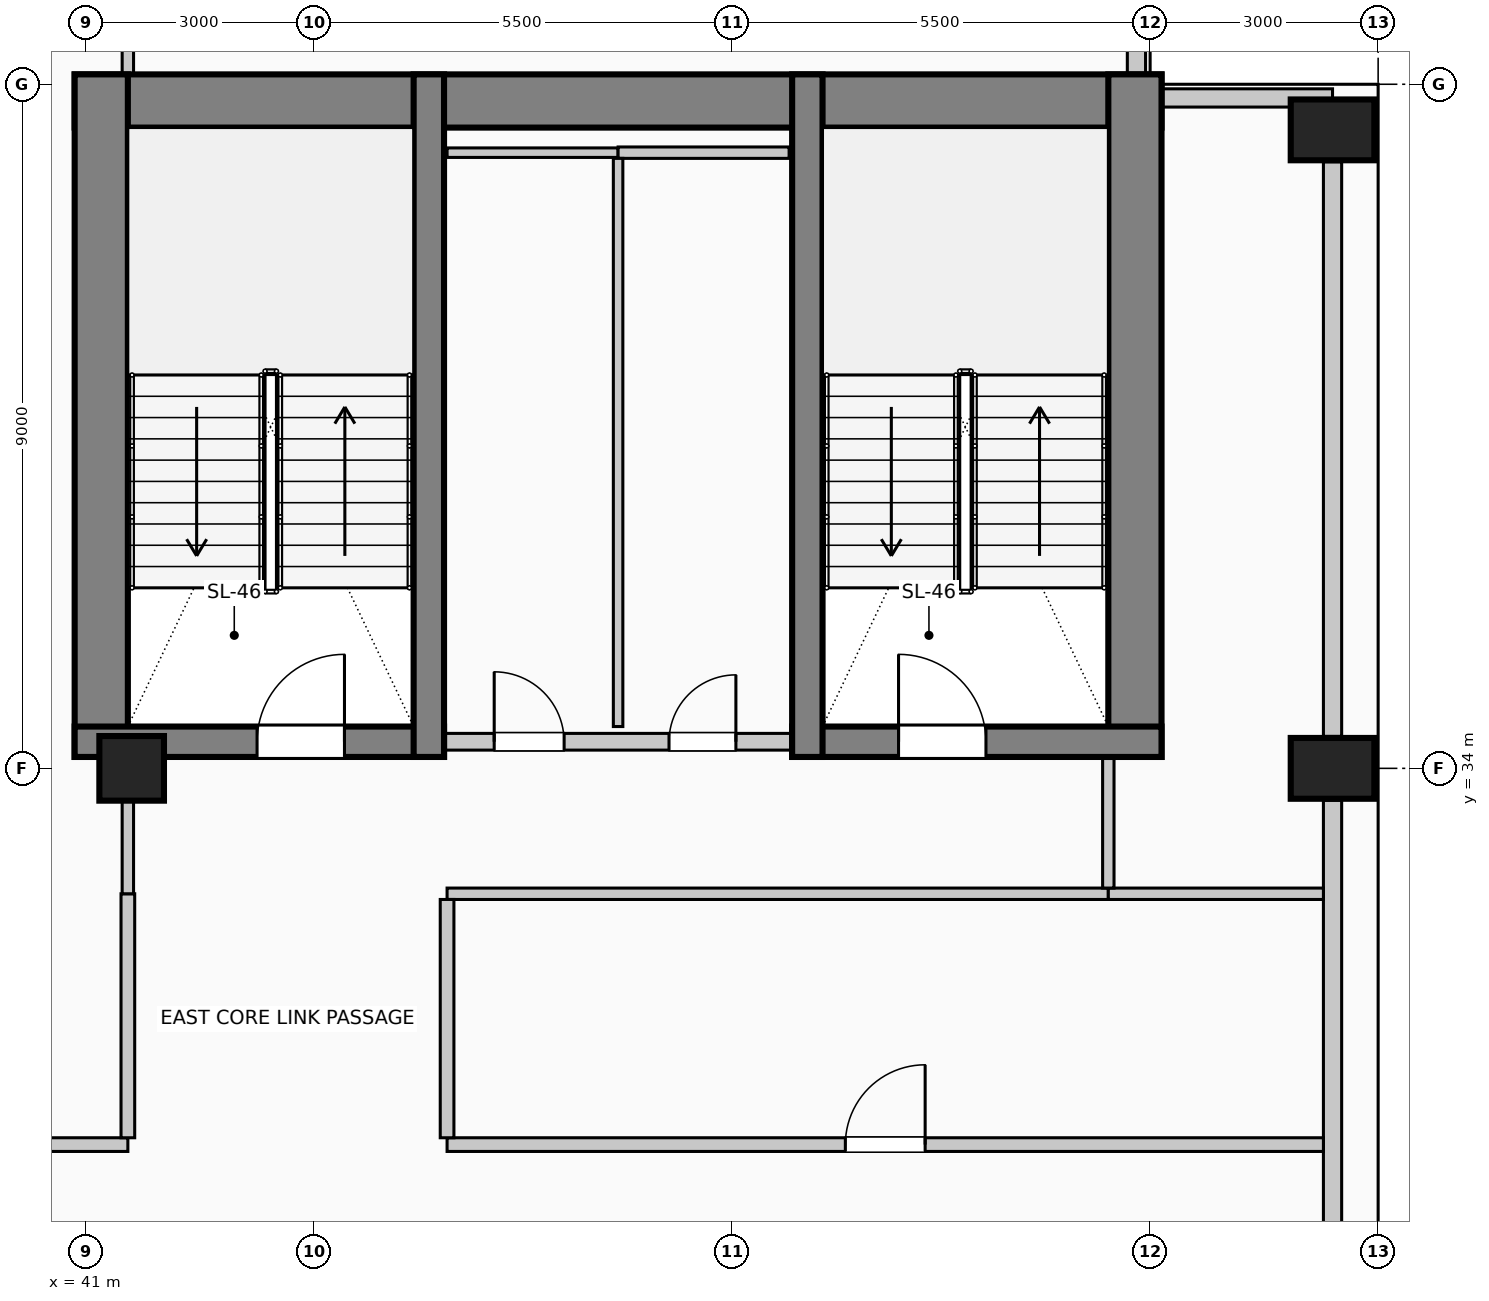
"""IFC4 building model, lengths in metres.
Left out: names, types, materials, properties, quantities, classifications, styles, units other than length and angle.
Written with IfcOpenShell. Run it as: python <this file> out.ifc"""

import sys

from ifc_helpers import new_model, si_unit, direction, frame, frame_2d, origin, origin_2d, place, context, subcontext, project, spatial, rectangle, circle, extrude, element, fill, save


model = new_model("IFC4")
c1 = context("Model", 3, precision=1e-05, world=origin(), true_north=direction((0.0, 1.0)))
c2 = subcontext(c1, "Body", "Model", "MODEL_VIEW")
j1 = project(units=[si_unit("LENGTHUNIT", "METRE"), si_unit("PLANEANGLEUNIT", "RADIAN")], contexts=[c1])
p1 = place(None, origin())
s1 = spatial("IfcSite", under=j1, at=p1, CompositionType="ELEMENT")
p2 = place(p1, origin())
s2 = spatial("IfcBuilding", under=s1, at=p2, CompositionType="ELEMENT")
p3 = place(p2, frame((0.0, 0.0, 206.6)))
s3 = spatial("IfcBuildingStorey", under=s2, at=p3, CompositionType="ELEMENT", Elevation=206.6)
p4 = place(p3, frame((40.85, 42.78, 0.0), z_axis=(0.0, 0.0, 1.0), x_axis=(1.0, 0.0, 0.0)))
e1 = element("IfcWall", 1, at=p4, inside=s3, PredefinedType="SHEAR", context=c2, shape_type="SweptSolid", body=[
    extrude(rectangle(XDim=14.3, YDim=0.7, at=frame_2d((7.15, 0.0))), origin(), (0.0, 0.0, 1.0), 4.0),
])
for number, where, z_axis, x_axis in (
    (2, (41.2, 34.15, 0.0), (0.0, 0.0, 1.0), (0.0, 1.0, 0.0)),
    (3, (54.8, 34.15, 0.0), (0.0, 0.0, 1.0), (0.0, 1.0, 0.0)),
):
    element("IfcWall", number, at=place(p3, frame(where, z_axis=z_axis, x_axis=x_axis)), inside=s3, PredefinedType="SHEAR", context=c2, shape_type="SweptSolid", body=[
        extrude(rectangle(XDim=8.98, YDim=0.7, at=frame_2d((4.49, 0.0))), origin(), (0.0, 0.0, 1.0), 4.0),
    ])
p5 = place(p3, frame((40.85, 34.35, 0.0), z_axis=(0.0, 0.0, 1.0), x_axis=(1.0, 0.0, 0.0)))
e4 = element("IfcWall", 4, at=p5, inside=s3, PredefinedType="SHEAR", context=c2, shape_type="SweptSolid", body=[
    extrude(rectangle(XDim=4.86, YDim=0.4, at=frame_2d((2.43, 0.0))), origin(), (0.0, 0.0, 1.0), 4.0),
])
p6 = place(p5, frame((2.4, 0.0, 0.0)))
e5 = element("IfcOpeningElement", 5, at=p6, cuts=e4, PredefinedType="OPENING", context=c2, shape_type="SweptSolid", body=[
    extrude(rectangle(XDim=1.15, YDim=2.2, at=frame_2d((0.575, 1.1))), frame((0.0, 0.21, 0.0), z_axis=(0.0, -1.0, 0.0), x_axis=(1.0, 0.0, 0.0)), (0.0, 0.0, 1.0), 0.42),
])
p7 = place(p3, frame((45.51, 34.15, 0.0), z_axis=(0.0, 0.0, 1.0), x_axis=(0.0, 1.0, 0.0)))
e6 = element("IfcWall", 6, at=p7, inside=s3, PredefinedType="SHEAR", context=c2, shape_type="SweptSolid", body=[
    extrude(rectangle(XDim=8.98, YDim=0.4, at=frame_2d((4.49, 0.0))), origin(), (0.0, 0.0, 1.0), 4.0),
])
p8 = place(p3, frame((50.29, 34.35, 0.0), z_axis=(0.0, 0.0, 1.0), x_axis=(1.0, 0.0, 0.0)))
e7 = element("IfcWall", 7, at=p8, inside=s3, PredefinedType="SHEAR", context=c2, shape_type="SweptSolid", body=[
    extrude(rectangle(XDim=4.86, YDim=0.4, at=frame_2d((2.43, 0.0))), origin(), (0.0, 0.0, 1.0), 4.0),
])
p9 = place(p8, frame((1.4, 0.0, 0.0)))
e8 = element("IfcOpeningElement", 8, at=p9, cuts=e7, PredefinedType="OPENING", context=c2, shape_type="SweptSolid", body=[
    extrude(rectangle(XDim=1.15, YDim=2.2, at=frame_2d((0.575, 1.1))), frame((0.0, 0.21, 0.0), z_axis=(0.0, -1.0, 0.0), x_axis=(1.0, 0.0, 0.0)), (0.0, 0.0, 1.0), 0.42),
])
p10 = place(p3, frame((50.49, 34.15, 0.0), z_axis=(0.0, 0.0, 1.0), x_axis=(0.0, 1.0, 0.0)))
e9 = element("IfcWall", 9, at=p10, inside=s3, PredefinedType="SHEAR", context=c2, shape_type="SweptSolid", body=[
    extrude(rectangle(XDim=8.98, YDim=0.4, at=frame_2d((4.49, 0.0))), origin(), (0.0, 0.0, 1.0), 4.0),
])
for number, where, z_axis, x_axis in (
    (10, (57.4, 34.0, 0.0), (0.0, 0.0, 1.0), (0.0, 1.0, 0.0)),
    (11, (57.4, 42.4, 0.0), (0.0, 0.0, 1.0), (0.0, 1.0, 0.0)),
):
    element("IfcColumn", number, at=place(p3, frame(where, z_axis=z_axis, x_axis=x_axis)), inside=s3, PredefinedType="COLUMN", context=c2, shape_type="SweptSolid", body=[
        extrude(rectangle(XDim=0.8, YDim=1.1, at=origin_2d()), origin(), (0.0, 0.0, 1.0), 4.0),
    ])
p11 = place(p3, frame((41.6, 34.0, 0.0), z_axis=(0.0, 0.0, 1.0), x_axis=(1.0, 0.0, 0.0)))
e12 = element("IfcColumn", 12, at=p11, inside=s3, PredefinedType="COLUMN", context=c2, shape_type="SweptSolid", body=[
    extrude(circle(Radius=0.425, at=origin_2d()), origin(), (0.0, 0.0, 1.0), 4.0),
])
p12 = place(p3, frame((57.4, 33.58, 0.0), z_axis=(0.0, 0.0, 1.0), x_axis=(0.0, -1.0, 0.0)))
e13 = element("IfcWall", 13, at=p12, inside=s3, PredefinedType="SOLIDWALL", context=c2, shape_type="SweptSolid", body=[
    extrude(rectangle(XDim=7.16, YDim=0.24, at=frame_2d((3.58, 0.0))), origin(), (0.0, 0.0, 1.0), 3.0),
])
p13 = place(p3, frame((57.4, 41.98, 0.0), z_axis=(0.0, 0.0, 1.0), x_axis=(0.0, -1.0, 0.0)))
e14 = element("IfcWall", 14, at=p13, inside=s3, PredefinedType="SOLIDWALL", context=c2, shape_type="SweptSolid", body=[
    extrude(rectangle(XDim=7.56, YDim=0.24, at=frame_2d((3.78, 0.0))), origin(), (0.0, 0.0, 1.0), 3.0),
])
p14 = place(p3, frame((54.82, 45.4, 0.0), z_axis=(0.0, 0.0, 1.0), x_axis=(0.0, -1.0, 0.0)))
e15 = element("IfcWall", 15, at=p14, inside=s3, PredefinedType="SOLIDWALL", context=c2, shape_type="SweptSolid", body=[
    extrude(rectangle(XDim=2.265, YDim=0.24, at=frame_2d((1.132, 0.0))), origin(), (0.0, 0.0, 1.0), 3.75),
])
p15 = place(p3, frame((55.155, 42.82, 0.0), z_axis=(0.0, 0.0, 1.0), x_axis=(1.0, 0.0, 0.0)))
e16 = element("IfcWall", 16, at=p15, inside=s3, PredefinedType="SOLIDWALL", context=c2, shape_type="SweptSolid", body=[
    extrude(rectangle(XDim=2.245, YDim=0.24, at=frame_2d((1.123, 0.0))), origin(), (0.0, 0.0, 1.0), 3.75),
])
p16 = place(p3, frame((45.72, 34.35, 0.0), z_axis=(0.0, 0.0, 1.0), x_axis=(1.0, 0.0, 0.0)))
e17 = element("IfcWall", 17, at=p16, inside=s3, PredefinedType="PARTITIONING", context=c2, shape_type="SweptSolid", body=[
    extrude(rectangle(XDim=4.56, YDim=0.22, at=frame_2d((2.28, 0.0))), origin(), (0.0, 0.0, 1.0), 3.75),
])
p17 = place(p16, frame((0.65, 0.0, 0.0)))
e18 = element("IfcOpeningElement", 18, at=p17, cuts=e17, PredefinedType="OPENING", context=c2, shape_type="SweptSolid", body=[
    extrude(rectangle(XDim=0.92, YDim=2.1, at=frame_2d((0.46, 1.05))), frame((0.0, 0.12, 0.0), z_axis=(0.0, -1.0, 0.0), x_axis=(1.0, 0.0, 0.0)), (0.0, 0.0, 1.0), 0.24),
])
p18 = place(p16, frame((2.95, 0.0, 0.0)))
e19 = element("IfcOpeningElement", 19, at=p18, cuts=e17, PredefinedType="OPENING", context=c2, shape_type="SweptSolid", body=[
    extrude(rectangle(XDim=0.88, YDim=2.1, at=frame_2d((0.44, 1.05))), frame((0.0, 0.12, 0.0), z_axis=(0.0, -1.0, 0.0), x_axis=(1.0, 0.0, 0.0)), (0.0, 0.0, 1.0), 0.24),
])
p19 = place(p3, frame((34.22, 29.05, 0.0), z_axis=(0.0, 0.0, 1.0), x_axis=(1.0, 0.0, 0.0)))
e20 = element("IfcWall", 20, at=p19, inside=s3, PredefinedType="PARTITIONING", context=c2, shape_type="SweptSolid", body=[
    extrude(rectangle(XDim=7.33, YDim=0.18, at=frame_2d((3.665, 0.0))), origin(), (0.0, 0.0, 1.0), 3.75),
])
p20 = place(p19, frame((3.19, 0.0, 0.0)))
e21 = element("IfcOpeningElement", 21, at=p20, cuts=e20, PredefinedType="OPENING", context=c2, shape_type="SweptSolid", body=[
    extrude(rectangle(XDim=0.95, YDim=2.15, at=frame_2d((0.475, 1.075))), frame((0.0, 0.1, 0.0), z_axis=(0.0, -1.0, 0.0), x_axis=(1.0, 0.0, 0.0)), (0.0, 0.0, 1.0), 0.2),
])
p21 = place(p3, frame((45.75, 29.05, 0.0), z_axis=(0.0, 0.0, 1.0), x_axis=(1.0, 0.0, 0.0)))
e22 = element("IfcWall", 22, at=p21, inside=s3, PredefinedType="PARTITIONING", context=c2, shape_type="SweptSolid", body=[
    extrude(rectangle(XDim=11.53, YDim=0.18, at=frame_2d((5.765, 0.0))), origin(), (0.0, 0.0, 1.0), 3.75),
])
p22 = place(p21, frame((5.24, 0.0, 0.0)))
e23 = element("IfcOpeningElement", 23, at=p22, cuts=e22, PredefinedType="OPENING", context=c2, shape_type="SweptSolid", body=[
    extrude(rectangle(XDim=1.05, YDim=2.15, at=frame_2d((0.525, 1.075))), frame((0.0, 0.1, 0.0), z_axis=(0.0, -1.0, 0.0), x_axis=(1.0, 0.0, 0.0)), (0.0, 0.0, 1.0), 0.2),
])
p23 = place(p3, frame((45.75, 32.35, 0.0), z_axis=(0.0, 0.0, 1.0), x_axis=(1.0, 0.0, 0.0)))
e24 = element("IfcWall", 24, at=p23, inside=s3, PredefinedType="PARTITIONING", context=c2, shape_type="SweptSolid", body=[
    extrude(rectangle(XDim=8.7, YDim=0.15, at=frame_2d((4.35, 0.0))), origin(), (0.0, 0.0, 1.0), 3.75),
])
p24 = place(p3, frame((54.45, 32.35, 0.0), z_axis=(0.0, 0.0, 1.0), x_axis=(1.0, 0.0, 0.0)))
e25 = element("IfcWall", 25, at=p24, inside=s3, PredefinedType="PARTITIONING", context=c2, shape_type="SweptSolid", body=[
    extrude(rectangle(XDim=2.83, YDim=0.15, at=frame_2d((1.415, 0.0))), origin(), (0.0, 0.0, 1.0), 3.75),
])
p25 = place(p3, frame((45.75, 42.1, 0.0), z_axis=(0.0, 0.0, 1.0), x_axis=(1.0, 0.0, 0.0)))
e26 = element("IfcWall", 26, at=p25, inside=s3, PredefinedType="PARTITIONING", context=c2, shape_type="SweptSolid", body=[
    extrude(rectangle(XDim=2.25, YDim=0.125, at=frame_2d((1.125, 0.0))), origin(), (0.0, 0.0, 1.0), 3.75),
])
p26 = place(p3, frame((48.0, 42.1, 0.0), z_axis=(0.0, 0.0, 1.0), x_axis=(1.0, 0.0, 0.0)))
e27 = element("IfcWall", 27, at=p26, inside=s3, PredefinedType="PARTITIONING", context=c2, shape_type="SweptSolid", body=[
    extrude(rectangle(XDim=2.25, YDim=0.15, at=frame_2d((1.125, 0.0))), origin(), (0.0, 0.0, 1.0), 3.75),
])
p27 = place(p3, frame((41.55, 29.14, 0.0), z_axis=(0.0, 0.0, 1.0), x_axis=(0.0, 1.0, 0.0)))
e28 = element("IfcWall", 28, at=p27, inside=s3, PredefinedType="PARTITIONING", context=c2, shape_type="SweptSolid", body=[
    extrude(rectangle(XDim=3.21, YDim=0.18, at=frame_2d((1.605, 0.0))), origin(), (0.0, 0.0, 1.0), 3.145),
])
p28 = place(p3, frame((41.55, 32.35, 0.0), z_axis=(0.0, 0.0, 1.0), x_axis=(0.0, 1.0, 0.0)))
e29 = element("IfcWall", 29, at=p28, inside=s3, PredefinedType="PARTITIONING", context=c2, shape_type="SweptSolid", body=[
    extrude(rectangle(XDim=1.225, YDim=0.15, at=frame_2d((0.612, 0.0))), origin(), (0.0, 0.0, 1.0), 3.145),
])
p29 = place(p3, frame((41.55, 43.13, 0.0), z_axis=(0.0, 0.0, 1.0), x_axis=(0.0, 1.0, 0.0)))
e30 = element("IfcWall", 30, at=p29, inside=s3, PredefinedType="PARTITIONING", context=c2, shape_type="SweptSolid", body=[
    extrude(rectangle(XDim=1.62, YDim=0.15, at=frame_2d((0.81, 0.0))), origin(), (0.0, 0.0, 1.0), 3.75),
])
p30 = place(p3, frame((45.75, 29.14, 0.0), z_axis=(0.0, 0.0, 1.0), x_axis=(0.0, 1.0, 0.0)))
e31 = element("IfcWall", 31, at=p30, inside=s3, PredefinedType="PARTITIONING", context=c2, shape_type="SweptSolid", body=[
    extrude(rectangle(XDim=3.135, YDim=0.18, at=frame_2d((1.567, 0.0))), origin(), (0.0, 0.0, 1.0), 3.75),
])
p31 = place(p3, frame((48.0, 34.55, 0.0), z_axis=(0.0, 0.0, 1.0), x_axis=(0.0, 1.0, 0.0)))
e32 = element("IfcWall", 32, at=p31, inside=s3, PredefinedType="PARTITIONING", context=c2, shape_type="SweptSolid", body=[
    extrude(rectangle(XDim=7.475, YDim=0.125, at=frame_2d((3.737, 0.0))), origin(), (0.0, 0.0, 1.0), 3.75),
])
p32 = place(p3, frame((54.45, 32.425, 0.0), z_axis=(0.0, 0.0, 1.0), x_axis=(0.0, 1.0, 0.0)))
e33 = element("IfcWall", 33, at=p32, inside=s3, PredefinedType="PARTITIONING", context=c2, shape_type="SweptSolid", body=[
    extrude(rectangle(XDim=1.725, YDim=0.15, at=frame_2d((0.862, 0.0))), origin(), (0.0, 0.0, 1.0), 3.75),
])
p33 = place(p6, origin())
e34 = element("IfcDoor", 34, at=p33, inside=s3, OperationType="SINGLE_SWING_RIGHT", PredefinedType="DOOR", context=c2, shape_type="SweptSolid", body=[
    extrude(rectangle(XDim=1.15, YDim=2.2, at=frame_2d((0.575, 1.1))), frame((0.0, 0.025, 0.0), z_axis=(0.0, -1.0, 0.0), x_axis=(1.0, 0.0, 0.0)), (0.0, 0.0, 1.0), 0.05),
])
fill(e5, e34)
p34 = place(p17, origin())
e35 = element("IfcDoor", 35, at=p34, inside=s3, OperationType="SINGLE_SWING_LEFT", PredefinedType="DOOR", context=c2, shape_type="SweptSolid", body=[
    extrude(rectangle(XDim=0.92, YDim=2.1, at=frame_2d((0.46, 1.05))), frame((0.0, 0.025, 0.0), z_axis=(0.0, -1.0, 0.0), x_axis=(1.0, 0.0, 0.0)), (0.0, 0.0, 1.0), 0.05),
])
fill(e18, e35)
p35 = place(p18, origin())
e36 = element("IfcDoor", 36, at=p35, inside=s3, OperationType="SINGLE_SWING_RIGHT", PredefinedType="DOOR", context=c2, shape_type="SweptSolid", body=[
    extrude(rectangle(XDim=0.88, YDim=2.1, at=frame_2d((0.44, 1.05))), frame((0.0, 0.025, 0.0), z_axis=(0.0, -1.0, 0.0), x_axis=(1.0, 0.0, 0.0)), (0.0, 0.0, 1.0), 0.05),
])
fill(e19, e36)
p36 = place(p9, origin())
e37 = element("IfcDoor", 37, at=p36, inside=s3, OperationType="SINGLE_SWING_LEFT", PredefinedType="DOOR", context=c2, shape_type="SweptSolid", body=[
    extrude(rectangle(XDim=1.15, YDim=2.2, at=frame_2d((0.575, 1.1))), frame((0.0, 0.025, 0.0), z_axis=(0.0, -1.0, 0.0), x_axis=(1.0, 0.0, 0.0)), (0.0, 0.0, 1.0), 0.05),
])
fill(e8, e37)
p37 = place(p22, origin())
e38 = element("IfcDoor", 38, at=p37, inside=s3, OperationType="SINGLE_SWING_RIGHT", PredefinedType="DOOR", context=c2, shape_type="SweptSolid", body=[
    extrude(rectangle(XDim=1.05, YDim=2.15, at=frame_2d((0.525, 1.075))), frame((0.0, 0.025, 0.0), z_axis=(0.0, -1.0, 0.0), x_axis=(1.0, 0.0, 0.0)), (0.0, 0.0, 1.0), 0.05),
])
fill(e23, e38)
save(model, sys.argv[1])
